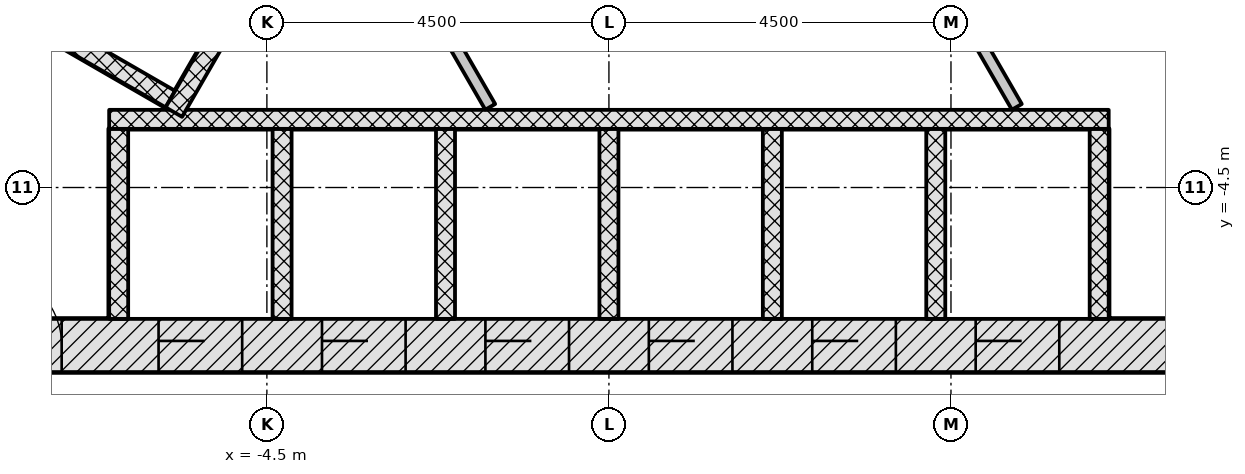
"""IFC4 building model, lengths in metres.
Left out: names, types, materials, properties, quantities, classifications, styles, units other than length and angle.
Written with IfcOpenShell. Run it as: python <this file> out.ifc"""

import sys

from ifc_helpers import new_model, si_unit, direction, frame, frame_2d, origin, place, context, subcontext, project, spatial, rectangle, extrude, element, fill, save


model = new_model("IFC4")
c1 = context("Model", 3, precision=1e-05, world=origin(), true_north=direction((0.0, 1.0)))
c2 = subcontext(c1, "Body", "Model", "MODEL_VIEW")
j1 = project(units=[si_unit("LENGTHUNIT", "METRE"), si_unit("PLANEANGLEUNIT", "RADIAN")], contexts=[c1])
p1 = place(None, origin())
s1 = spatial("IfcSite", under=j1, at=p1, CompositionType="ELEMENT")
p2 = place(p1, origin())
s2 = spatial("IfcBuilding", under=s1, at=p2, CompositionType="ELEMENT")
p3 = place(p2, frame((0.0, 0.0, 109.5)))
s3 = spatial("IfcBuildingStorey", under=s2, at=p3, CompositionType="ELEMENT", Elevation=109.5)
p4 = place(p3, frame((-9.229, -6.578, -0.2), z_axis=(0.0, 0.0, 1.0), x_axis=(1.0, 0.0, 0.0)))
e1 = element("IfcWall", 1, at=p4, inside=s3, PredefinedType="SHEAR", context=c2, shape_type="SweptSolid", body=[
    extrude(rectangle(XDim=18.458, YDim=0.7, at=frame_2d((9.229, 0.0))), origin(), (0.0, 0.0, 1.0), 3.6),
])
p5 = place(p4, frame((3.304, 0.0, 0.2)))
e2 = element("IfcOpeningElement", 2, at=p5, cuts=e1, PredefinedType="OPENING", context=c2, shape_type="SweptSolid", body=[
    extrude(rectangle(XDim=1.1, YDim=2.1, at=frame_2d((0.55, 1.05))), frame((0.0, 0.36, 0.0), z_axis=(0.0, -1.0, 0.0), x_axis=(1.0, 0.0, 0.0)), (0.0, 0.0, 1.0), 0.72),
])
p6 = place(p4, frame((5.454, 0.0, 0.2)))
e3 = element("IfcOpeningElement", 3, at=p6, cuts=e1, PredefinedType="OPENING", context=c2, shape_type="SweptSolid", body=[
    extrude(rectangle(XDim=1.1, YDim=2.1, at=frame_2d((0.55, 1.05))), frame((0.0, 0.36, 0.0), z_axis=(0.0, -1.0, 0.0), x_axis=(1.0, 0.0, 0.0)), (0.0, 0.0, 1.0), 0.72),
])
p7 = place(p4, frame((7.604, 0.0, 0.2)))
e4 = element("IfcOpeningElement", 4, at=p7, cuts=e1, PredefinedType="OPENING", context=c2, shape_type="SweptSolid", body=[
    extrude(rectangle(XDim=1.1, YDim=2.1, at=frame_2d((0.55, 1.05))), frame((0.0, 0.36, 0.0), z_axis=(0.0, -1.0, 0.0), x_axis=(1.0, 0.0, 0.0)), (0.0, 0.0, 1.0), 0.72),
])
p8 = place(p4, frame((9.754, 0.0, 0.2)))
e5 = element("IfcOpeningElement", 5, at=p8, cuts=e1, PredefinedType="OPENING", context=c2, shape_type="SweptSolid", body=[
    extrude(rectangle(XDim=1.1, YDim=2.1, at=frame_2d((0.55, 1.05))), frame((0.0, 0.36, 0.0), z_axis=(0.0, -1.0, 0.0), x_axis=(1.0, 0.0, 0.0)), (0.0, 0.0, 1.0), 0.72),
])
p9 = place(p4, frame((11.904, 0.0, 0.2)))
e6 = element("IfcOpeningElement", 6, at=p9, cuts=e1, PredefinedType="OPENING", context=c2, shape_type="SweptSolid", body=[
    extrude(rectangle(XDim=1.1, YDim=2.1, at=frame_2d((0.55, 1.05))), frame((0.0, 0.36, 0.0), z_axis=(0.0, -1.0, 0.0), x_axis=(1.0, 0.0, 0.0)), (0.0, 0.0, 1.0), 0.72),
])
p10 = place(p4, frame((14.054, 0.0, 0.2)))
e7 = element("IfcOpeningElement", 7, at=p10, cuts=e1, PredefinedType="OPENING", context=c2, shape_type="SweptSolid", body=[
    extrude(rectangle(XDim=1.1, YDim=2.1, at=frame_2d((0.55, 1.05))), frame((0.0, 0.36, 0.0), z_axis=(0.0, -1.0, 0.0), x_axis=(1.0, 0.0, 0.0)), (0.0, 0.0, 1.0), 0.72),
])
p11 = place(p4, frame((1.029, 0.0, 0.2)))
e8 = element("IfcOpeningElement", 8, at=p11, cuts=e1, PredefinedType="OPENING", context=c2, shape_type="SweptSolid", body=[
    extrude(rectangle(XDim=1.0, YDim=2.1, at=frame_2d((0.5, 1.05))), frame((0.0, 0.36, 0.0), z_axis=(0.0, -1.0, 0.0), x_axis=(1.0, 0.0, 0.0)), (0.0, 0.0, 1.0), 0.72),
])
p12 = place(p3, frame((10.311, -4.703, -0.2), z_axis=(0.0, 0.0, 1.0), x_axis=(-0.500001446645, 0.866024568562, 0.0)))
e9 = element("IfcWall", 9, at=p12, inside=s3, PredefinedType="SHEAR", context=c2, shape_type="SweptSolid", body=[
    extrude(rectangle(XDim=18.458, YDim=0.7, at=frame_2d((9.229, 0.0))), origin(), (0.0, 0.0, 1.0), 3.6),
])
p13 = place(p12, frame((10.5, 0.0, 0.2)))
e10 = element("IfcOpeningElement", 10, at=p13, cuts=e9, PredefinedType="OPENING", context=c2, shape_type="SweptSolid", body=[
    extrude(rectangle(XDim=1.0, YDim=2.1, at=frame_2d((0.5, 1.05))), frame((0.0, 0.36, 0.0), z_axis=(0.0, -1.0, 0.0), x_axis=(1.0, 0.0, 0.0)), (0.0, 0.0, 1.0), 0.72),
])
p14 = place(p12, frame((4.877, 0.0, 0.2)))
e11 = element("IfcOpeningElement", 11, at=p14, cuts=e9, PredefinedType="OPENING", context=c2, shape_type="SweptSolid", body=[
    extrude(rectangle(XDim=0.9, YDim=2.1, at=frame_2d((0.45, 1.05))), frame((0.0, 0.36, 0.0), z_axis=(0.0, -1.0, 0.0), x_axis=(1.0, 0.0, 0.0)), (0.0, 0.0, 1.0), 0.72),
])
p15 = place(p12, frame((14.452, 0.0, 0.2)))
e12 = element("IfcOpeningElement", 12, at=p15, cuts=e9, PredefinedType="OPENING", context=c2, shape_type="SweptSolid", body=[
    extrude(rectangle(XDim=0.9, YDim=2.1, at=frame_2d((0.45, 1.05))), frame((0.0, 0.36, 0.0), z_axis=(0.0, -1.0, 0.0), x_axis=(1.0, 0.0, 0.0)), (0.0, 0.0, 1.0), 0.72),
])
p16 = place(p3, frame((-1.083, 11.281, -0.2), z_axis=(0.0, 0.0, 1.0), x_axis=(-0.500001446645, -0.866024568562, 0.0)))
e13 = element("IfcWall", 13, at=p16, inside=s3, PredefinedType="SHEAR", context=c2, shape_type="SweptSolid", body=[
    extrude(rectangle(XDim=18.458, YDim=0.7, at=frame_2d((9.229, 0.0))), origin(), (0.0, 0.0, 1.0), 3.6),
])
p17 = place(p16, frame((8.979, 0.0, 0.2)))
e14 = element("IfcOpeningElement", 14, at=p17, cuts=e13, PredefinedType="OPENING", context=c2, shape_type="SweptSolid", body=[
    extrude(rectangle(XDim=1.2, YDim=2.1, at=frame_2d((0.6, 1.05))), frame((0.0, 0.36, 0.0), z_axis=(0.0, -1.0, 0.0), x_axis=(1.0, 0.0, 0.0)), (0.0, 0.0, 1.0), 0.72),
])
p18 = place(p16, frame((11.029, 0.0, 0.2)))
e15 = element("IfcOpeningElement", 15, at=p18, cuts=e13, PredefinedType="OPENING", context=c2, shape_type="SweptSolid", body=[
    extrude(rectangle(XDim=1.2, YDim=2.1, at=frame_2d((0.6, 1.05))), frame((0.0, 0.36, 0.0), z_axis=(0.0, -1.0, 0.0), x_axis=(1.0, 0.0, 0.0)), (0.0, 0.0, 1.0), 0.72),
])
for number, where, z_axis, x_axis in (
    (16, (-6.45, -6.228, -0.2), (0.0, 0.0, 1.0), (0.0, 1.0, 0.0)),
    (17, (-4.3, -6.228, -0.2), (0.0, 0.0, 1.0), (0.0, 1.0, 0.0)),
    (18, (-2.15, -6.228, -0.2), (0.0, 0.0, 1.0), (0.0, 1.0, 0.0)),
    (19, (0.0, -6.228, -0.2), (0.0, 0.0, 1.0), (0.0, 1.0, 0.0)),
    (20, (2.15, -6.228, -0.2), (0.0, 0.0, 1.0), (0.0, 1.0, 0.0)),
    (21, (4.3, -6.228, -0.2), (0.0, 0.0, 1.0), (0.0, 1.0, 0.0)),
    (22, (6.45, -6.228, -0.2), (0.0, 0.0, 1.0), (0.0, 1.0, 0.0)),
):
    element("IfcWall", number, at=place(p3, frame(where, z_axis=z_axis, x_axis=x_axis)), inside=s3, PredefinedType="PARTITIONING", context=c2, shape_type="SweptSolid", body=[
        extrude(rectangle(XDim=2.5, YDim=0.25, at=frame_2d((1.25, 0.0))), origin(), (0.0, 0.0, 1.0), 3.6),
    ])
p19 = place(p3, frame((-6.575, -3.603, 0.0), z_axis=(0.0, 0.0, 1.0), x_axis=(1.0, 0.0, 0.0)))
e23 = element("IfcWall", 23, at=p19, inside=s3, PredefinedType="PARTITIONING", context=c2, shape_type="SweptSolid", body=[
    extrude(rectangle(XDim=13.15, YDim=0.25, at=frame_2d((6.575, 0.0))), origin(), (0.0, 0.0, 1.0), 3.4),
])
p20 = place(p3, frame((-8.281, -1.887, -0.2), z_axis=(0.0, 0.0, 1.0), x_axis=(0.866032775405, -0.499987231761, 0.0)))
e24 = element("IfcWall", 24, at=p20, inside=s3, PredefinedType="PARTITIONING", context=c2, shape_type="SweptSolid", body=[
    extrude(rectangle(XDim=2.9, YDim=0.25, at=frame_2d((1.45, 0.0))), origin(), (0.0, 0.0, 1.0), 3.6),
])
p21 = place(p3, frame((0.176, 6.711, 0.0), z_axis=(0.0, 0.0, 1.0), x_axis=(-0.500004227369, -0.866022963098, 0.0)))
e25 = element("IfcWall", 25, at=p21, inside=s3, PredefinedType="PARTITIONING", context=c2, shape_type="SweptSolid", body=[
    extrude(rectangle(XDim=11.8, YDim=0.25, at=frame_2d((5.9, 0.0))), origin(), (0.0, 0.0, 1.0), 3.4),
])
p22 = place(p3, frame((5.367, -3.439, 0.0), z_axis=(0.0, 0.0, 1.0), x_axis=(-0.499981499682, 0.866036084685, 0.0)))
e26 = element("IfcWall", 26, at=p22, inside=s3, PredefinedType="PARTITIONING", context=c2, shape_type="SweptSolid", body=[
    extrude(rectangle(XDim=6.608, YDim=0.15, at=frame_2d((3.304, 0.0))), origin(), (0.0, 0.0, 1.0), 3.4),
])
p23 = place(p3, frame((-1.561, -3.439, 0.0), z_axis=(0.0, 0.0, 1.0), x_axis=(-0.499989077369, 0.866031709877, 0.0)))
e27 = element("IfcWall", 27, at=p23, inside=s3, PredefinedType="PARTITIONING", context=c2, shape_type="SweptSolid", body=[
    extrude(rectangle(XDim=3.144, YDim=0.15, at=frame_2d((1.572, 0.0))), origin(), (0.0, 0.0, 1.0), 3.4),
])
p24 = place(p3, frame((-16.169, -3.099, 0.0), z_axis=(0.0, 0.0, 1.0), x_axis=(0.499999805269, 0.866025516212, 0.0)))
e28 = element("IfcWall", 28, at=p24, inside=s3, PredefinedType="PARTITIONING", context=c2, shape_type="SweptSolid", body=[
    extrude(rectangle(XDim=22.097, YDim=0.15, at=frame_2d((11.049, 0.0))), origin(), (0.0, 0.0, 1.0), 2.847),
])
p25 = place(p24, frame((17.776, 0.0, 0.0)))
e29 = element("IfcOpeningElement", 29, at=p25, cuts=e28, PredefinedType="OPENING", context=c2, shape_type="SweptSolid", body=[
    extrude(rectangle(XDim=1.0, YDim=2.1, at=frame_2d((0.5, 1.05))), frame((0.0, 0.085, 0.0), z_axis=(0.0, -1.0, 0.0), x_axis=(1.0, 0.0, 0.0)), (0.0, 0.0, 1.0), 0.17),
])
p26 = place(p24, frame((15.186, 0.0, 0.0)))
e30 = element("IfcOpeningElement", 30, at=p26, cuts=e28, PredefinedType="OPENING", context=c2, shape_type="SweptSolid", body=[
    extrude(rectangle(XDim=1.0, YDim=2.1, at=frame_2d((0.5, 1.05))), frame((0.0, 0.085, 0.0), z_axis=(0.0, -1.0, 0.0), x_axis=(1.0, 0.0, 0.0)), (0.0, 0.0, 1.0), 0.17),
])
p27 = place(p24, frame((11.84, 0.0, 0.0)))
e31 = element("IfcOpeningElement", 31, at=p27, cuts=e28, PredefinedType="OPENING", context=c2, shape_type="SweptSolid", body=[
    extrude(rectangle(XDim=1.5, YDim=2.1, at=frame_2d((0.75, 1.05))), frame((0.0, 0.085, 0.0), z_axis=(0.0, -1.0, 0.0), x_axis=(1.0, 0.0, 0.0)), (0.0, 0.0, 1.0), 0.17),
])
p28 = place(p24, frame((4.503, 0.0, 0.0)))
e32 = element("IfcOpeningElement", 32, at=p28, cuts=e28, PredefinedType="OPENING", context=c2, shape_type="SweptSolid", body=[
    extrude(rectangle(XDim=1.5, YDim=2.1, at=frame_2d((0.75, 1.05))), frame((0.0, 0.085, 0.0), z_axis=(0.0, -1.0, 0.0), x_axis=(1.0, 0.0, 0.0)), (0.0, 0.0, 1.0), 0.17),
])
p29 = place(p3, frame((5.289, 8.446, 0.0), z_axis=(0.0, 0.0, 1.0), x_axis=(0.499996620721, -0.866027354803, 0.0)))
e33 = element("IfcWall", 33, at=p29, inside=s3, PredefinedType="PARTITIONING", context=c2, shape_type="SweptSolid", body=[
    extrude(rectangle(XDim=15.057, YDim=0.15, at=frame_2d((7.528, 0.0))), origin(), (0.0, 0.0, 1.0), 2.847),
])
p30 = place(p29, frame((10.689, 0.0, 0.0)))
e34 = element("IfcOpeningElement", 34, at=p30, cuts=e33, PredefinedType="OPENING", context=c2, shape_type="SweptSolid", body=[
    extrude(rectangle(XDim=1.0, YDim=2.1, at=frame_2d((0.5, 1.05))), frame((0.0, 0.085, 0.0), z_axis=(0.0, -1.0, 0.0), x_axis=(1.0, 0.0, 0.0)), (0.0, 0.0, 1.0), 0.17),
])
p31 = place(p29, frame((4.695, 0.0, 0.0)))
e35 = element("IfcOpeningElement", 35, at=p31, cuts=e33, PredefinedType="OPENING", context=c2, shape_type="SweptSolid", body=[
    extrude(rectangle(XDim=1.0, YDim=2.1, at=frame_2d((0.5, 1.05))), frame((0.0, 0.085, 0.0), z_axis=(0.0, -1.0, 0.0), x_axis=(1.0, 0.0, 0.0)), (0.0, 0.0, 1.0), 0.17),
])
p32 = place(p5, origin())
e36 = element("IfcDoor", 36, at=p32, inside=s3, OperationType="DOUBLE_DOOR_SLIDING", PredefinedType="DOOR", context=c2, shape_type="SweptSolid", body=[
    extrude(rectangle(XDim=1.1, YDim=2.1, at=frame_2d((0.55, 1.05))), frame((0.0, 0.025, 0.0), z_axis=(0.0, -1.0, 0.0), x_axis=(1.0, 0.0, 0.0)), (0.0, 0.0, 1.0), 0.05),
])
fill(e2, e36)
p33 = place(p6, origin())
e37 = element("IfcDoor", 37, at=p33, inside=s3, OperationType="DOUBLE_DOOR_SLIDING", PredefinedType="DOOR", context=c2, shape_type="SweptSolid", body=[
    extrude(rectangle(XDim=1.1, YDim=2.1, at=frame_2d((0.55, 1.05))), frame((0.0, 0.025, 0.0), z_axis=(0.0, -1.0, 0.0), x_axis=(1.0, 0.0, 0.0)), (0.0, 0.0, 1.0), 0.05),
])
fill(e3, e37)
p34 = place(p7, origin())
e38 = element("IfcDoor", 38, at=p34, inside=s3, OperationType="DOUBLE_DOOR_SLIDING", PredefinedType="DOOR", context=c2, shape_type="SweptSolid", body=[
    extrude(rectangle(XDim=1.1, YDim=2.1, at=frame_2d((0.55, 1.05))), frame((0.0, 0.025, 0.0), z_axis=(0.0, -1.0, 0.0), x_axis=(1.0, 0.0, 0.0)), (0.0, 0.0, 1.0), 0.05),
])
fill(e4, e38)
p35 = place(p8, origin())
e39 = element("IfcDoor", 39, at=p35, inside=s3, OperationType="DOUBLE_DOOR_SLIDING", PredefinedType="DOOR", context=c2, shape_type="SweptSolid", body=[
    extrude(rectangle(XDim=1.1, YDim=2.1, at=frame_2d((0.55, 1.05))), frame((0.0, 0.025, 0.0), z_axis=(0.0, -1.0, 0.0), x_axis=(1.0, 0.0, 0.0)), (0.0, 0.0, 1.0), 0.05),
])
fill(e5, e39)
p36 = place(p9, origin())
e40 = element("IfcDoor", 40, at=p36, inside=s3, OperationType="DOUBLE_DOOR_SLIDING", PredefinedType="DOOR", context=c2, shape_type="SweptSolid", body=[
    extrude(rectangle(XDim=1.1, YDim=2.1, at=frame_2d((0.55, 1.05))), frame((0.0, 0.025, 0.0), z_axis=(0.0, -1.0, 0.0), x_axis=(1.0, 0.0, 0.0)), (0.0, 0.0, 1.0), 0.05),
])
fill(e6, e40)
p37 = place(p10, origin())
e41 = element("IfcDoor", 41, at=p37, inside=s3, OperationType="DOUBLE_DOOR_SLIDING", PredefinedType="DOOR", context=c2, shape_type="SweptSolid", body=[
    extrude(rectangle(XDim=1.1, YDim=2.1, at=frame_2d((0.55, 1.05))), frame((0.0, 0.025, 0.0), z_axis=(0.0, -1.0, 0.0), x_axis=(1.0, 0.0, 0.0)), (0.0, 0.0, 1.0), 0.05),
])
fill(e7, e41)
p38 = place(p11, origin())
e42 = element("IfcDoor", 42, at=p38, inside=s3, OperationType="SINGLE_SWING_LEFT", PredefinedType="DOOR", context=c2, shape_type="SweptSolid", body=[
    extrude(rectangle(XDim=1.0, YDim=2.1, at=frame_2d((0.5, 1.05))), frame((0.0, 0.075, 0.0), z_axis=(0.0, -1.0, 0.0), x_axis=(1.0, 0.0, 0.0)), (0.0, 0.0, 1.0), 0.15),
])
fill(e8, e42)
save(model, sys.argv[1])
